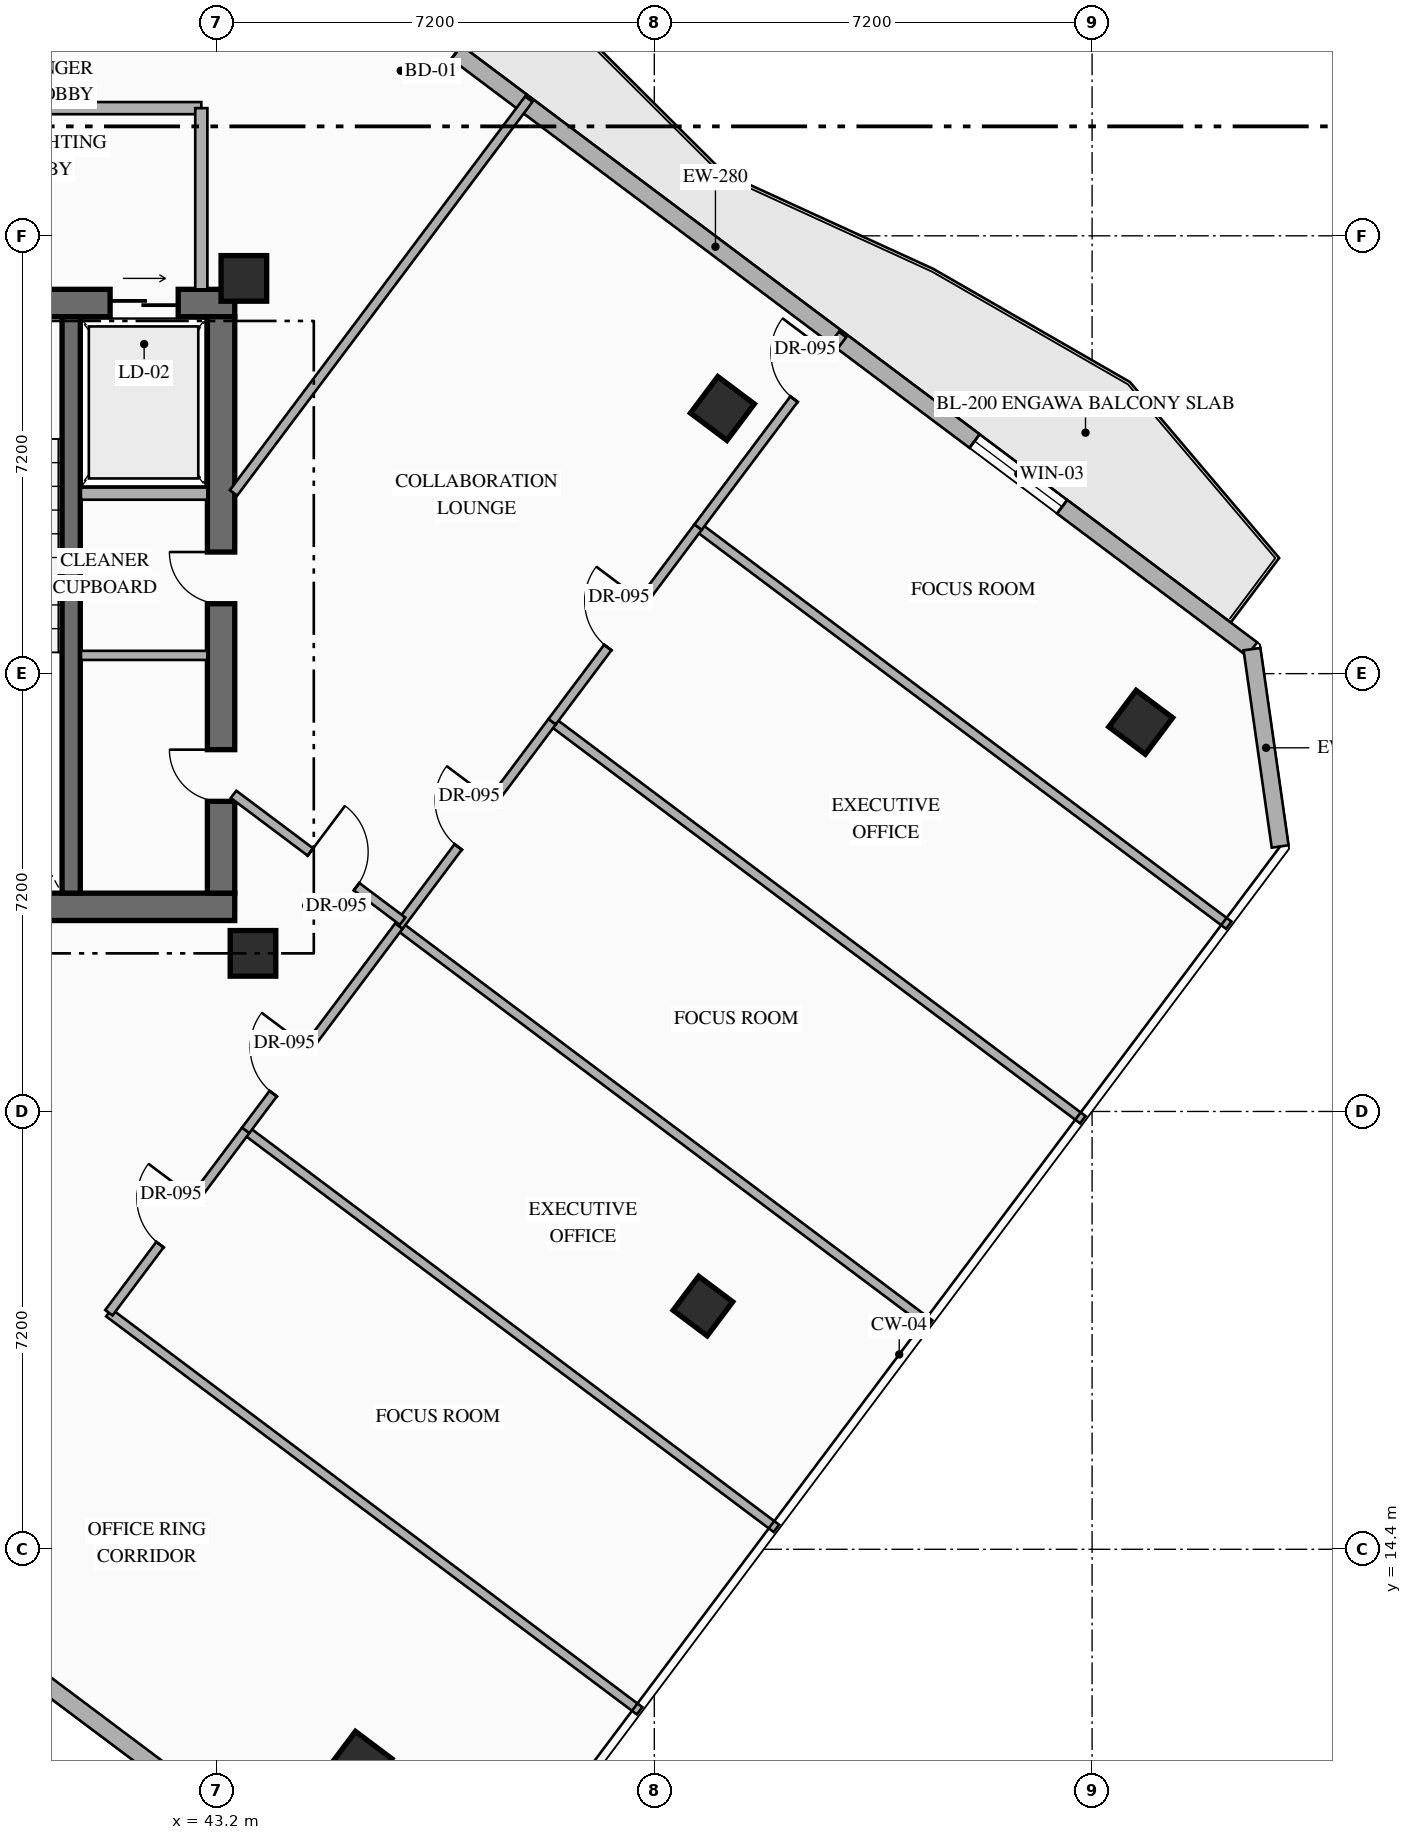
"""IFC4 building model, lengths in metres.
Left out: names, types, materials, properties, quantities, classifications, styles, units other than length and angle.
Written with IfcOpenShell. Run it as: python <this file> out.ifc"""

import sys

from ifc_helpers import new_model, si_unit, direction, frame, frame_2d, origin, origin_2d, place, context, subcontext, project, spatial, rectangle, hollow_rectangle, extrude, element, fill, save


model = new_model("IFC4")
c1 = context("Model", 3, precision=1e-05, world=origin(), true_north=direction((0.0, 1.0)))
c2 = subcontext(c1, "Body", "Model", "MODEL_VIEW")
j1 = project(units=[si_unit("LENGTHUNIT", "METRE"), si_unit("PLANEANGLEUNIT", "RADIAN")], contexts=[c1])
p1 = place(None, origin())
s1 = spatial("IfcSite", under=j1, at=p1, CompositionType="ELEMENT")
p2 = place(p1, origin())
s2 = spatial("IfcBuilding", under=s1, at=p2, CompositionType="ELEMENT")
p3 = place(p2, frame((0.0, 0.0, 209.55)))
s3 = spatial("IfcBuildingStorey", under=s2, at=p3, CompositionType="ELEMENT", Elevation=209.55)
p4 = place(p3, frame((36.04, 24.965, 0.0), z_axis=(0.0, 0.0, 1.0), x_axis=(1.0, 0.0, 0.0)))
e1 = element("IfcWall", 1, at=p4, inside=s3, PredefinedType="SHEAR", context=c2, shape_type="SweptSolid", body=[
    extrude(rectangle(XDim=7.46, YDim=0.45, at=frame_2d((3.73, 0.0))), origin(), (0.0, 0.0, 1.0), 3.6),
])
p5 = place(p3, frame((36.04, 34.895, 0.0), z_axis=(0.0, 0.0, 1.0), x_axis=(1.0, 0.0, 0.0)))
e2 = element("IfcWall", 2, at=p5, inside=s3, PredefinedType="SHEAR", context=c2, shape_type="SweptSolid", body=[
    extrude(rectangle(XDim=7.46, YDim=0.45, at=frame_2d((3.73, 0.0))), origin(), (0.0, 0.0, 1.0), 3.6),
])
p6 = place(p5, frame((2.51, 0.0, 0.0)))
e3 = element("IfcOpeningElement", 3, at=p6, cuts=e2, PredefinedType="OPENING", context=c2, shape_type="SweptSolid", body=[
    extrude(rectangle(XDim=1.1, YDim=2.2, at=frame_2d((0.55, 1.1))), frame((0.0, 0.235, 0.0), z_axis=(0.0, -1.0, 0.0), x_axis=(1.0, 0.0, 0.0)), (0.0, 0.0, 1.0), 0.47),
])
p7 = place(p5, frame((5.41, 0.0, 0.0)))
e4 = element("IfcOpeningElement", 4, at=p7, cuts=e2, PredefinedType="OPENING", context=c2, shape_type="SweptSolid", body=[
    extrude(rectangle(XDim=1.12, YDim=2.15, at=frame_2d((0.56, 1.075))), frame((0.0, 0.235, 0.0), z_axis=(0.0, -1.0, 0.0), x_axis=(1.0, 0.0, 0.0)), (0.0, 0.0, 1.0), 0.47),
])
p8 = place(p3, frame((43.275, 25.19, 0.0), z_axis=(0.0, 0.0, 1.0), x_axis=(0.0, 1.0, 0.0)))
e5 = element("IfcWall", 5, at=p8, inside=s3, PredefinedType="SHEAR", context=c2, shape_type="SweptSolid", body=[
    extrude(rectangle(XDim=9.48, YDim=0.45, at=frame_2d((4.74, 0.0))), origin(), (0.0, 0.0, 1.0), 3.6),
])
p9 = place(p8, frame((1.51, 0.0, 0.0)))
e6 = element("IfcOpeningElement", 6, at=p9, cuts=e5, PredefinedType="OPENING", context=c2, shape_type="SweptSolid", body=[
    extrude(rectangle(XDim=0.85, YDim=2.08, at=frame_2d((0.425, 1.04))), frame((0.0, 0.235, 0.0), z_axis=(0.0, -1.0, 0.0), x_axis=(1.0, 0.0, 0.0)), (0.0, 0.0, 1.0), 0.47),
])
p10 = place(p8, frame((4.76, 0.0, 0.0)))
e7 = element("IfcOpeningElement", 7, at=p10, cuts=e5, PredefinedType="OPENING", context=c2, shape_type="SweptSolid", body=[
    extrude(rectangle(XDim=0.85, YDim=2.08, at=frame_2d((0.425, 1.04))), frame((0.0, 0.235, 0.0), z_axis=(0.0, -1.0, 0.0), x_axis=(1.0, 0.0, 0.0)), (0.0, 0.0, 1.0), 0.47),
])
p11 = place(p3, frame((40.81, 25.19, 0.0), z_axis=(0.0, 0.0, 1.0), x_axis=(0.0, 1.0, 0.0)))
e8 = element("IfcWall", 8, at=p11, inside=s3, PredefinedType="SHEAR", context=c2, shape_type="SweptSolid", body=[
    extrude(rectangle(XDim=9.48, YDim=0.3, at=frame_2d((4.74, 0.0))), origin(), (0.0, 0.0, 1.0), 3.6),
])
for number, where, z_axis, x_axis in (
    (9, (43.8, 24.2, 0.0), (0.0, 0.0, 1.0), (1.0, 0.0, 0.0)),
    (10, (43.65, 35.3, 0.0), (0.0, 0.0, 1.0), (1.0, 0.0, 0.0)),
    (11, (51.52, 33.16, 0.0), (0.0, 0.0, 1.0), (0.8, -0.6, 0.0)),
    (12, (45.56, 10.88, 0.0), (0.0, 0.0, 1.0), (0.8, -0.6, 0.0)),
    (13, (58.4, 28.0, 0.0), (0.0, 0.0, 1.0), (0.8, -0.6, 0.0)),
):
    element("IfcColumn", number, at=place(p3, frame(where, z_axis=z_axis, x_axis=x_axis)), inside=s3, PredefinedType="COLUMN", context=c2, shape_type="SweptSolid", body=[
        extrude(hollow_rectangle(XDim=0.75, YDim=0.75, WallThickness=0.028, at=origin_2d()), origin(), (0.0, 0.0, 1.0), 3.6),
    ])
p12 = place(p3, frame((51.2, 18.4, 0.0), z_axis=(0.0, 0.0, 1.0), x_axis=(0.799999996291, -0.600000004945, 0.0)))
e14 = element("IfcColumn", 14, at=p12, inside=s3, PredefinedType="COLUMN", context=c2, shape_type="SweptSolid", body=[
    extrude(hollow_rectangle(XDim=0.7, YDim=0.7, WallThickness=0.028, at=origin_2d()), origin(), (0.0, 0.0, 1.0), 3.6),
])
p13 = place(p3, frame((44.86, 40.73, 0.0), z_axis=(0.0, 0.0, 1.0), x_axis=(0.800007624502, -0.599989833863, 0.0)))
e15 = element("IfcWall", 15, at=p13, inside=s3, PredefinedType="STANDARD", context=c2, shape_type="SweptSolid", body=[
    extrude(rectangle(XDim=19.212, YDim=0.28, at=frame_2d((9.606, 0.0))), origin(), (0.0, 0.0, 1.0), 3.35),
])
p14 = place(p13, frame((1.755, 0.0, 0.0)))
e16 = element("IfcOpeningElement", 16, at=p14, cuts=e15, PredefinedType="OPENING", context=c2, shape_type="SweptSolid", body=[
    extrude(rectangle(XDim=1.1, YDim=2.2, at=frame_2d((0.55, 1.1))), frame((0.0, 0.15, 0.0), z_axis=(0.0, -1.0, 0.0), x_axis=(1.0, 0.0, 0.0)), (0.0, 0.0, 1.0), 0.3),
])
p15 = place(p13, frame((13.509, 0.0, 0.85)))
e17 = element("IfcOpeningElement", 17, at=p15, cuts=e15, PredefinedType="OPENING", context=c2, shape_type="SweptSolid", body=[
    extrude(rectangle(XDim=1.8, YDim=2.1, at=frame_2d((0.9, 1.05))), frame((0.0, 0.15, 0.0), z_axis=(0.0, -1.0, 0.0), x_axis=(1.0, 0.0, 0.0)), (0.0, 0.0, 1.0), 0.3),
])
p16 = place(p3, frame((60.23, 29.203, 0.0), z_axis=(0.0, 0.0, 1.0), x_axis=(0.141296221922, -0.989967361922, 0.0)))
e18 = element("IfcWall", 18, at=p16, inside=s3, PredefinedType="STANDARD", context=c2, shape_type="SweptSolid", body=[
    extrude(rectangle(XDim=3.278, YDim=0.28, at=frame_2d((1.639, 0.0))), origin(), (0.0, 0.0, 1.0), 3.35),
])
p17 = place(p3, frame((44.918, 8.787, 0.0), z_axis=(0.0, 0.0, 1.0), x_axis=(-0.800004765927, 0.599993645378, 0.0)))
e19 = element("IfcWall", 19, at=p17, inside=s3, PredefinedType="STANDARD", context=c2, shape_type="SweptSolid", body=[
    extrude(rectangle(XDim=24.588, YDim=0.28, at=frame_2d((12.294, 0.0))), origin(), (0.0, 0.0, 1.0), 3.35),
])
p18 = place(p3, frame((40.97, 31.76, 0.0), z_axis=(0.0, 0.0, 1.0), x_axis=(1.0, 0.0, 0.0)))
e20 = element("IfcWall", 20, at=p18, inside=s3, PredefinedType="STANDARD", context=c2, shape_type="SweptSolid", body=[
    extrude(rectangle(XDim=2.08, YDim=0.2, at=frame_2d((1.04, 0.0))), origin(), (0.0, 0.0, 1.0), 3.35),
])
p19 = place(p3, frame((40.97, 29.1, 0.0), z_axis=(0.0, 0.0, 1.0), x_axis=(1.0, 0.0, 0.0)))
e21 = element("IfcWall", 21, at=p19, inside=s3, PredefinedType="PARTITIONING", context=c2, shape_type="SweptSolid", body=[
    extrude(rectangle(XDim=2.08, YDim=0.15, at=frame_2d((1.04, 0.0))), origin(), (0.0, 0.0, 1.0), 3.35),
])
p20 = place(p3, frame((37.65, 38.1, 0.0), z_axis=(0.0, 0.0, 1.0), x_axis=(1.0, 0.0, 0.0)))
e22 = element("IfcWall", 22, at=p20, inside=s3, PredefinedType="STANDARD", context=c2, shape_type="SweptSolid", body=[
    extrude(rectangle(XDim=5.3, YDim=0.2, at=frame_2d((2.65, 0.0))), origin(), (0.0, 0.0, 1.0), 3.35),
])
p21 = place(p3, frame((42.95, 35.12, 0.0), z_axis=(0.0, 0.0, 1.0), x_axis=(0.0, 1.0, 0.0)))
e23 = element("IfcWall", 23, at=p21, inside=s3, PredefinedType="STANDARD", context=c2, shape_type="SweptSolid", body=[
    extrude(rectangle(XDim=2.98, YDim=0.2, at=frame_2d((1.49, 0.0))), origin(), (0.0, 0.0, 1.0), 3.35),
])
for number, where, z_axis, x_axis in (
    (24, (41.43, 18.29, 0.0), (0.0, 0.0, 1.0), (0.8, -0.6, 0.0)),
    (25, (43.68, 21.29, 0.0), (0.0, 0.0, 1.0), (0.8, -0.6, 0.0)),
):
    element("IfcWall", number, at=place(p3, frame(where, z_axis=z_axis, x_axis=x_axis)), inside=s3, PredefinedType="PARTITIONING", context=c2, shape_type="SweptSolid", body=[
        extrude(rectangle(XDim=10.91, YDim=0.15, at=frame_2d((5.455, 0.0))), origin(), (0.0, 0.0, 1.0), 3.35),
    ])
p22 = place(p3, frame((41.43, 18.29, 0.0), z_axis=(0.0, 0.0, 1.0), x_axis=(0.6, 0.8, 0.0)))
e26 = element("IfcWall", 26, at=p22, inside=s3, PredefinedType="PARTITIONING", context=c2, shape_type="SweptSolid", body=[
    extrude(rectangle(XDim=3.75, YDim=0.15, at=frame_2d((1.875, 0.0))), origin(), (0.0, 0.0, 1.0), 3.35),
])
p23 = place(p22, frame((1.4, 0.0, 0.0)))
e27 = element("IfcOpeningElement", 27, at=p23, cuts=e26, PredefinedType="OPENING", context=c2, shape_type="SweptSolid", body=[
    extrude(rectangle(XDim=0.95, YDim=2.15, at=frame_2d((0.475, 1.075))), frame((0.0, 0.085, 0.0), z_axis=(0.0, -1.0, 0.0), x_axis=(1.0, 0.0, 0.0)), (0.0, 0.0, 1.0), 0.17),
])
p24 = place(p3, frame((46.2, 24.65, 0.0), z_axis=(0.0, 0.0, 1.0), x_axis=(0.800005370633, -0.599992839089, 0.0)))
e28 = element("IfcWall", 28, at=p24, inside=s3, PredefinedType="PARTITIONING", context=c2, shape_type="SweptSolid", body=[
    extrude(rectangle(XDim=10.91, YDim=0.15, at=frame_2d((5.455, 0.0))), origin(), (0.0, 0.0, 1.0), 3.35),
])
p25 = place(p3, frame((43.68, 21.29, 0.0), z_axis=(0.0, 0.0, 1.0), x_axis=(0.600018601461, 0.799986048566, 0.0)))
e29 = element("IfcWall", 29, at=p25, inside=s3, PredefinedType="PARTITIONING", context=c2, shape_type="SweptSolid", body=[
    extrude(rectangle(XDim=4.2, YDim=0.15, at=frame_2d((2.1, 0.0))), origin(), (0.0, 0.0, 1.0), 3.35),
])
p26 = place(p25, frame((0.754, 0.0, 0.0)))
e30 = element("IfcOpeningElement", 30, at=p26, cuts=e29, PredefinedType="OPENING", context=c2, shape_type="SweptSolid", body=[
    extrude(rectangle(XDim=0.95, YDim=2.15, at=frame_2d((0.475, 1.075))), frame((0.0, 0.085, 0.0), z_axis=(0.0, -1.0, 0.0), x_axis=(1.0, 0.0, 0.0)), (0.0, 0.0, 1.0), 0.17),
])
p27 = place(p3, frame((48.72, 28.01, 0.0), z_axis=(0.0, 0.0, 1.0), x_axis=(0.800005370633, -0.599992839089, 0.0)))
e31 = element("IfcWall", 31, at=p27, inside=s3, PredefinedType="PARTITIONING", context=c2, shape_type="SweptSolid", body=[
    extrude(rectangle(XDim=10.91, YDim=0.15, at=frame_2d((5.455, 0.0))), origin(), (0.0, 0.0, 1.0), 3.35),
])
p28 = place(p3, frame((46.2, 24.65, 0.0), z_axis=(0.0, 0.0, 1.0), x_axis=(0.59999069958, 0.80000697523, 0.0)))
e32 = element("IfcWall", 32, at=p28, inside=s3, PredefinedType="PARTITIONING", context=c2, shape_type="SweptSolid", body=[
    extrude(rectangle(XDim=4.2, YDim=0.15, at=frame_2d((2.1, 0.0))), origin(), (0.0, 0.0, 1.0), 3.35),
])
p29 = place(p28, frame((1.625, 0.0, 0.0)))
e33 = element("IfcOpeningElement", 33, at=p29, cuts=e32, PredefinedType="OPENING", context=c2, shape_type="SweptSolid", body=[
    extrude(rectangle(XDim=0.95, YDim=2.15, at=frame_2d((0.475, 1.075))), frame((0.0, 0.085, 0.0), z_axis=(0.0, -1.0, 0.0), x_axis=(1.0, 0.0, 0.0)), (0.0, 0.0, 1.0), 0.17),
])
p30 = place(p3, frame((51.12, 31.21, 0.0), z_axis=(0.0, 0.0, 1.0), x_axis=(0.799997314611, -0.600003580502, 0.0)))
e34 = element("IfcWall", 34, at=p30, inside=s3, PredefinedType="PARTITIONING", context=c2, shape_type="SweptSolid", body=[
    extrude(rectangle(XDim=10.91, YDim=0.15, at=frame_2d((5.455, 0.0))), origin(), (0.0, 0.0, 1.0), 3.045),
])
p31 = place(p3, frame((48.72, 28.01, 0.0), z_axis=(0.0, 0.0, 1.0), x_axis=(0.600029296115, 0.799978027076, 0.0)))
e35 = element("IfcWall", 35, at=p31, inside=s3, PredefinedType="PARTITIONING", context=c2, shape_type="SweptSolid", body=[
    extrude(rectangle(XDim=4.0, YDim=0.15, at=frame_2d((2.0, 0.0))), origin(), (0.0, 0.0, 1.0), 3.35),
])
p32 = place(p31, frame((1.525, 0.0, 0.0)))
e36 = element("IfcOpeningElement", 36, at=p32, cuts=e35, PredefinedType="OPENING", context=c2, shape_type="SweptSolid", body=[
    extrude(rectangle(XDim=0.95, YDim=2.15, at=frame_2d((0.475, 1.075))), frame((0.0, 0.085, 0.0), z_axis=(0.0, -1.0, 0.0), x_axis=(1.0, 0.0, 0.0)), (0.0, 0.0, 1.0), 0.17),
])
p33 = place(p3, frame((51.12, 31.21, 0.0), z_axis=(0.0, 0.0, 1.0), x_axis=(0.6, 0.8, 0.0)))
e37 = element("IfcWall", 37, at=p33, inside=s3, PredefinedType="PARTITIONING", context=c2, shape_type="SweptSolid", body=[
    extrude(rectangle(XDim=3.96, YDim=0.15, at=frame_2d((1.98, 0.0))), origin(), (0.0, 0.0, 1.0), 3.35),
])
p34 = place(p33, frame((2.63, 0.0, 0.0)))
e38 = element("IfcOpeningElement", 38, at=p34, cuts=e37, PredefinedType="OPENING", context=c2, shape_type="SweptSolid", body=[
    extrude(rectangle(XDim=0.95, YDim=2.15, at=frame_2d((0.475, 1.075))), frame((0.0, 0.085, 0.0), z_axis=(0.0, -1.0, 0.0), x_axis=(1.0, 0.0, 0.0)), (0.0, 0.0, 1.0), 0.17),
])
p35 = place(p3, frame((43.48, 26.815, 0.0), z_axis=(0.0, 0.0, 1.0), x_axis=(0.800008430676, -0.599988758934, 0.0)))
e39 = element("IfcWall", 39, at=p35, inside=s3, PredefinedType="PARTITIONING", context=c2, shape_type="SweptSolid", body=[
    extrude(rectangle(XDim=3.475, YDim=0.15, at=frame_2d((1.738, 0.0))), origin(), (0.0, 0.0, 1.0), 3.35),
])
p36 = place(p35, frame((1.58, 0.0, 0.0)))
e40 = element("IfcOpeningElement", 40, at=p36, cuts=e39, PredefinedType="OPENING", context=c2, shape_type="SweptSolid", body=[
    extrude(rectangle(XDim=0.95, YDim=2.15, at=frame_2d((0.475, 1.075))), frame((0.0, 0.085, 0.0), z_axis=(0.0, -1.0, 0.0), x_axis=(1.0, 0.0, 0.0)), (0.0, 0.0, 1.0), 0.17),
])
p37 = place(p3, frame((43.48, 31.773, 0.0), z_axis=(0.0, 0.0, 1.0), x_axis=(0.599971041729, 0.800021717885, 0.0)))
e41 = element("IfcWall", 41, at=p37, inside=s3, PredefinedType="PARTITIONING", context=c2, shape_type="SweptSolid", body=[
    extrude(rectangle(XDim=8.094, YDim=0.15, at=frame_2d((4.047, 0.0))), origin(), (0.0, 0.0, 1.0), 3.35),
])
p38 = place(p14, origin())
e42 = element("IfcDoor", 42, at=p38, inside=s3, OperationType="SINGLE_SWING_LEFT", PredefinedType="DOOR", context=c2, shape_type="SweptSolid", body=[
    extrude(rectangle(XDim=1.1, YDim=2.2, at=frame_2d((0.55, 1.1))), frame((0.0, 0.025, 0.0), z_axis=(0.0, -1.0, 0.0), x_axis=(1.0, 0.0, 0.0)), (0.0, 0.0, 1.0), 0.05),
])
fill(e16, e42)
p39 = place(p15, origin())
e43 = element("IfcWindow", 43, at=p39, inside=s3, PartitioningType="SINGLE_PANEL", PredefinedType="WINDOW", context=c2, shape_type="SweptSolid", body=[
    extrude(rectangle(XDim=1.8, YDim=2.1, at=frame_2d((0.9, 1.05))), frame((0.0, 0.03, 0.0), z_axis=(0.0, -1.0, 0.0), x_axis=(1.0, 0.0, 0.0)), (0.0, 0.0, 1.0), 0.06),
])
fill(e17, e43)
p40 = place(p7, origin())
e44 = element("IfcDoor", 44, at=p40, inside=s3, OperationType="SLIDING_TO_RIGHT", PredefinedType="USERDEFINED", context=c2, shape_type="SweptSolid", body=[
    extrude(rectangle(XDim=1.12, YDim=2.15, at=frame_2d((0.56, 1.075))), frame((0.0, 0.025, 0.0), z_axis=(0.0, -1.0, 0.0), x_axis=(1.0, 0.0, 0.0)), (0.0, 0.0, 1.0), 0.05),
])
fill(e4, e44)
p41 = place(p9, origin())
e45 = element("IfcDoor", 45, at=p41, inside=s3, OperationType="SINGLE_SWING_RIGHT", PredefinedType="DOOR", context=c2, shape_type="SweptSolid", body=[
    extrude(rectangle(XDim=0.85, YDim=2.08, at=frame_2d((0.425, 1.04))), frame((0.0, 0.025, 0.0), z_axis=(0.0, -1.0, 0.0), x_axis=(1.0, 0.0, 0.0)), (0.0, 0.0, 1.0), 0.05),
])
fill(e6, e45)
p42 = place(p10, origin())
e46 = element("IfcDoor", 46, at=p42, inside=s3, OperationType="SINGLE_SWING_RIGHT", PredefinedType="DOOR", context=c2, shape_type="SweptSolid", body=[
    extrude(rectangle(XDim=0.85, YDim=2.08, at=frame_2d((0.425, 1.04))), frame((0.0, 0.025, 0.0), z_axis=(0.0, -1.0, 0.0), x_axis=(1.0, 0.0, 0.0)), (0.0, 0.0, 1.0), 0.05),
])
fill(e7, e46)
p43 = place(p23, origin())
e47 = element("IfcDoor", 47, at=p43, inside=s3, OperationType="SINGLE_SWING_RIGHT", PredefinedType="DOOR", context=c2, shape_type="SweptSolid", body=[
    extrude(rectangle(XDim=0.95, YDim=2.15, at=frame_2d((0.475, 1.075))), frame((0.0, 0.025, 0.0), z_axis=(0.0, -1.0, 0.0), x_axis=(1.0, 0.0, 0.0)), (0.0, 0.0, 1.0), 0.05),
])
fill(e27, e47)
p44 = place(p26, origin())
e48 = element("IfcDoor", 48, at=p44, inside=s3, OperationType="SINGLE_SWING_RIGHT", PredefinedType="DOOR", context=c2, shape_type="SweptSolid", body=[
    extrude(rectangle(XDim=0.95, YDim=2.15, at=frame_2d((0.475, 1.075))), frame((0.0, 0.025, 0.0), z_axis=(0.0, -1.0, 0.0), x_axis=(1.0, 0.0, 0.0)), (0.0, 0.0, 1.0), 0.05),
])
fill(e30, e48)
p45 = place(p29, origin())
e49 = element("IfcDoor", 49, at=p45, inside=s3, OperationType="SINGLE_SWING_RIGHT", PredefinedType="DOOR", context=c2, shape_type="SweptSolid", body=[
    extrude(rectangle(XDim=0.95, YDim=2.15, at=frame_2d((0.475, 1.075))), frame((0.0, 0.025, 0.0), z_axis=(0.0, -1.0, 0.0), x_axis=(1.0, 0.0, 0.0)), (0.0, 0.0, 1.0), 0.05),
])
fill(e33, e49)
p46 = place(p32, origin())
e50 = element("IfcDoor", 50, at=p46, inside=s3, OperationType="SINGLE_SWING_RIGHT", PredefinedType="DOOR", context=c2, shape_type="SweptSolid", body=[
    extrude(rectangle(XDim=0.95, YDim=2.15, at=frame_2d((0.475, 1.075))), frame((0.0, 0.025, 0.0), z_axis=(0.0, -1.0, 0.0), x_axis=(1.0, 0.0, 0.0)), (0.0, 0.0, 1.0), 0.05),
])
fill(e36, e50)
p47 = place(p34, origin())
e51 = element("IfcDoor", 51, at=p47, inside=s3, OperationType="SINGLE_SWING_RIGHT", PredefinedType="DOOR", context=c2, shape_type="SweptSolid", body=[
    extrude(rectangle(XDim=0.95, YDim=2.15, at=frame_2d((0.475, 1.075))), frame((0.0, 0.025, 0.0), z_axis=(0.0, -1.0, 0.0), x_axis=(1.0, 0.0, 0.0)), (0.0, 0.0, 1.0), 0.05),
])
fill(e38, e51)
p48 = place(p36, origin())
e52 = element("IfcDoor", 52, at=p48, inside=s3, OperationType="SINGLE_SWING_LEFT", PredefinedType="DOOR", context=c2, shape_type="SweptSolid", body=[
    extrude(rectangle(XDim=0.95, YDim=2.15, at=frame_2d((0.475, 1.075))), frame((0.0, 0.025, 0.0), z_axis=(0.0, -1.0, 0.0), x_axis=(1.0, 0.0, 0.0)), (0.0, 0.0, 1.0), 0.05),
])
fill(e40, e52)
save(model, sys.argv[1])
